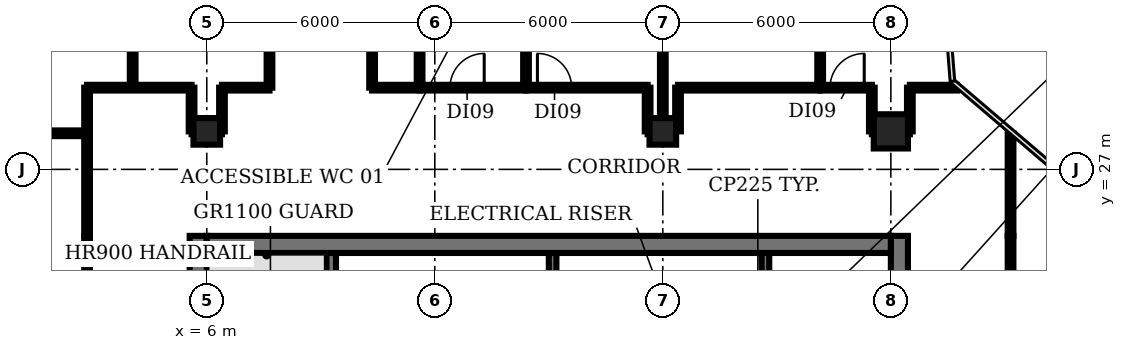
"""IFC4 building model, lengths in metres.
Left out: names, types, materials, properties, quantities, classifications, styles, units other than length and angle.
Written with IfcOpenShell. Run it as: python <this file> out.ifc"""

import sys

from ifc_helpers import new_model, si_unit, direction, frame, frame_2d, origin, origin_2d, place, context, subcontext, project, spatial, rectangle, circle, extrude, element, fill, save


model = new_model("IFC4")
c1 = context("Model", 3, precision=1e-05, world=origin(), true_north=direction((0.0, 1.0)))
c2 = subcontext(c1, "Body", "Model", "MODEL_VIEW")
j1 = project(units=[si_unit("LENGTHUNIT", "METRE"), si_unit("PLANEANGLEUNIT", "RADIAN")], contexts=[c1])
p1 = place(None, origin())
s1 = spatial("IfcSite", under=j1, at=p1, CompositionType="ELEMENT")
p2 = place(p1, origin())
s2 = spatial("IfcBuilding", under=s1, at=p2, CompositionType="ELEMENT")
p3 = place(p2, frame((0.0, 0.0, 209.6)))
s3 = spatial("IfcBuildingStorey", under=s2, at=p3, CompositionType="ELEMENT", Elevation=209.6)
for number, where, z_axis, x_axis in (
    (1, (6.0, 28.0, 0.0), (0.0, 0.0, 1.0), (1.0, 0.0, 0.0)),
    (2, (18.0, 28.0, 0.0), (0.0, 0.0, 1.0), (1.0, 0.0, 0.0)),
):
    element("IfcColumn", number, at=place(p3, frame(where, z_axis=z_axis, x_axis=x_axis)), inside=s3, PredefinedType="COLUMN", context=c2, shape_type="SweptSolid", body=[
        extrude(rectangle(XDim=0.7, YDim=0.7, at=origin_2d()), origin(), (0.0, 0.0, 1.0), 3.8),
    ])
p4 = place(p3, frame((24.0, 28.0, 0.0), z_axis=(0.0, 0.0, 1.0), x_axis=(1.0, 0.0, 0.0)))
e3 = element("IfcColumn", 3, at=p4, inside=s3, PredefinedType="COLUMN", context=c2, shape_type="SweptSolid", body=[
    extrude(circle(Radius=0.45, at=origin_2d()), origin(), (0.0, 0.0, 1.0), 3.8),
])
p5 = place(p3, frame((9.275, 18.375, 0.0), z_axis=(0.0, 0.0, 1.0), x_axis=(0.0, 1.0, 0.0)))
e4 = element("IfcWall", 4, at=p5, inside=s3, PredefinedType="SHEAR", context=c2, shape_type="SweptSolid", body=[
    extrude(rectangle(XDim=6.425, YDim=0.25, at=frame_2d((3.212, 0.0))), origin(), (0.0, 0.0, 1.0), 3.8),
])
for number, where, z_axis, x_axis in (
    (5, (15.1, 22.9, 0.0), (0.0, 0.0, 1.0), (0.0, 1.0, 0.0)),
    (6, (20.7, 22.9, 0.0), (0.0, 0.0, 1.0), (0.0, 1.0, 0.0)),
):
    element("IfcWall", number, at=place(p3, frame(where, z_axis=z_axis, x_axis=x_axis)), inside=s3, PredefinedType="SHEAR", context=c2, shape_type="SweptSolid", body=[
        extrude(rectangle(XDim=1.9, YDim=0.2, at=frame_2d((0.95, 0.0))), origin(), (0.0, 0.0, 1.0), 3.8),
    ])
p6 = place(p3, frame((5.775, 4.42, 0.0), z_axis=(0.0, 0.0, 1.0), x_axis=(0.0, 1.0, 0.0)))
e7 = element("IfcWall", 7, at=p6, inside=s3, PredefinedType="SHEAR", context=c2, shape_type="SweptSolid", body=[
    extrude(rectangle(XDim=20.83, YDim=0.45, at=frame_2d((10.415, 0.0))), origin(), (0.0, 0.0, 1.0), 3.8),
])
p7 = place(p6, frame((1.23, 0.0, 0.0)))
e8 = element("IfcOpeningElement", 8, at=p7, cuts=e7, PredefinedType="OPENING", context=c2, shape_type="SweptSolid", body=[
    extrude(rectangle(XDim=1.5, YDim=2.1, at=frame_2d((0.75, 1.05))), frame((0.0, 0.235, 0.0), z_axis=(0.0, -1.0, 0.0), x_axis=(1.0, 0.0, 0.0)), (0.0, 0.0, 1.0), 0.47),
])
p8 = place(p6, frame((7.68, 0.0, 0.0)))
e9 = element("IfcOpeningElement", 9, at=p8, cuts=e7, PredefinedType="OPENING", context=c2, shape_type="SweptSolid", body=[
    extrude(rectangle(XDim=1.2, YDim=2.1, at=frame_2d((0.6, 1.05))), frame((0.0, 0.235, 0.0), z_axis=(0.0, -1.0, 0.0), x_axis=(1.0, 0.0, 0.0)), (0.0, 0.0, 1.0), 0.47),
])
p9 = place(p6, frame((14.23, 0.0, 0.0)))
e10 = element("IfcOpeningElement", 10, at=p9, cuts=e7, PredefinedType="OPENING", context=c2, shape_type="SweptSolid", body=[
    extrude(rectangle(XDim=1.2, YDim=2.1, at=frame_2d((0.6, 1.05))), frame((0.0, 0.235, 0.0), z_axis=(0.0, -1.0, 0.0), x_axis=(1.0, 0.0, 0.0)), (0.0, 0.0, 1.0), 0.47),
])
p10 = place(p3, frame((24.225, 25.25, 0.0), z_axis=(0.0, 0.0, 1.0), x_axis=(0.0, -1.0, 0.0)))
e11 = element("IfcWall", 11, at=p10, inside=s3, PredefinedType="SHEAR", context=c2, shape_type="SweptSolid", body=[
    extrude(rectangle(XDim=20.83, YDim=0.45, at=frame_2d((10.415, 0.0))), origin(), (0.0, 0.0, 1.0), 3.8),
])
p11 = place(p10, frame((18.1, 0.0, 0.0)))
e12 = element("IfcOpeningElement", 12, at=p11, cuts=e11, PredefinedType="OPENING", context=c2, shape_type="SweptSolid", body=[
    extrude(rectangle(XDim=1.5, YDim=2.1, at=frame_2d((0.75, 1.05))), frame((0.0, 0.235, 0.0), z_axis=(0.0, -1.0, 0.0), x_axis=(1.0, 0.0, 0.0)), (0.0, 0.0, 1.0), 0.47),
])
p12 = place(p10, frame((12.0, 0.0, 0.0)))
e13 = element("IfcOpeningElement", 13, at=p12, cuts=e11, PredefinedType="OPENING", context=c2, shape_type="SweptSolid", body=[
    extrude(rectangle(XDim=0.9, YDim=2.1, at=frame_2d((0.45, 1.05))), frame((0.0, 0.235, 0.0), z_axis=(0.0, -1.0, 0.0), x_axis=(1.0, 0.0, 0.0)), (0.0, 0.0, 1.0), 0.47),
])
p13 = place(p10, frame((6.0, 0.0, 0.0)))
e14 = element("IfcOpeningElement", 14, at=p13, cuts=e11, PredefinedType="OPENING", context=c2, shape_type="SweptSolid", body=[
    extrude(rectangle(XDim=2.0, YDim=2.1, at=frame_2d((1.0, 1.05))), frame((0.0, 0.235, 0.0), z_axis=(0.0, -1.0, 0.0), x_axis=(1.0, 0.0, 0.0)), (0.0, 0.0, 1.0), 0.47),
])
p14 = place(p3, frame((6.0, 25.025, 0.0), z_axis=(0.0, 0.0, 1.0), x_axis=(1.0, 0.0, 0.0)))
e15 = element("IfcWall", 15, at=p14, inside=s3, PredefinedType="SHEAR", context=c2, shape_type="SweptSolid", body=[
    extrude(rectangle(XDim=18.0, YDim=0.45, at=frame_2d((9.0, 0.0))), origin(), (0.0, 0.0, 1.0), 3.8),
])
p15 = place(p3, frame((-0.98, 27.95, 0.0), z_axis=(0.0, 0.0, 1.0), x_axis=(1.0, 0.0, 0.0)))
e16 = element("IfcWall", 16, at=p15, inside=s3, PredefinedType="PARTITIONING", context=c2, shape_type="SweptSolid", body=[
    extrude(rectangle(XDim=3.83, YDim=0.15, at=frame_2d((1.915, 0.0))), origin(), (0.0, 0.0, 1.0), 2.83),
])
p16 = place(p3, frame((2.85, 5.77, 0.0), z_axis=(0.0, 0.0, 1.0), x_axis=(0.0, 1.0, 0.0)))
e17 = element("IfcWall", 17, at=p16, inside=s3, PredefinedType="PARTITIONING", context=c2, shape_type="SweptSolid", body=[
    extrude(rectangle(XDim=19.48, YDim=0.15, at=frame_2d((9.74, 0.0))), origin(), (0.0, 0.0, 1.0), 2.83),
])
p17 = place(p16, frame((8.48, 0.0, 0.0)))
e18 = element("IfcOpeningElement", 18, at=p17, cuts=e17, PredefinedType="OPENING", context=c2, shape_type="SweptSolid", body=[
    extrude(rectangle(XDim=1.2, YDim=2.1, at=frame_2d((0.6, 1.05))), frame((0.0, 0.085, 0.0), z_axis=(0.0, -1.0, 0.0), x_axis=(1.0, 0.0, 0.0)), (0.0, 0.0, 1.0), 0.17),
])
p18 = place(p3, frame((2.85, 25.25, 0.0), z_axis=(0.0, 0.0, 1.0), x_axis=(0.0, 1.0, 0.0)))
e19 = element("IfcWall", 19, at=p18, inside=s3, PredefinedType="PARTITIONING", context=c2, shape_type="SweptSolid", body=[
    extrude(rectangle(XDim=3.9, YDim=0.15, at=frame_2d((1.95, 0.0))), origin(), (0.0, 0.0, 1.0), 2.83),
])
p19 = place(p3, frame((2.85, 29.15, 0.0), z_axis=(0.0, 0.0, 1.0), x_axis=(1.0, 0.0, 0.0)))
e20 = element("IfcWall", 20, at=p19, inside=s3, PredefinedType="PARTITIONING", context=c2, shape_type="SweptSolid", body=[
    extrude(rectangle(XDim=2.75, YDim=0.15, at=frame_2d((1.375, 0.0))), origin(), (0.0, 0.0, 1.0), 2.83),
])
p20 = place(p3, frame((4.05, 29.15, 0.0), z_axis=(0.0, 0.0, 1.0), x_axis=(0.0, 1.0, 0.0)))
e21 = element("IfcWall", 21, at=p20, inside=s3, PredefinedType="PARTITIONING", context=c2, shape_type="SweptSolid", body=[
    extrude(rectangle(XDim=4.8, YDim=0.15, at=frame_2d((2.4, 0.0))), origin(), (0.0, 0.0, 1.0), 2.83),
])
p21 = place(p3, frame((5.6, 28.0, 0.0), z_axis=(0.0, 0.0, 1.0), x_axis=(0.0, 1.0, 0.0)))
e22 = element("IfcWall", 22, at=p21, inside=s3, PredefinedType="PARTITIONING", context=c2, shape_type="SweptSolid", body=[
    extrude(rectangle(XDim=1.15, YDim=0.15, at=frame_2d((0.575, 0.0))), origin(), (0.0, 0.0, 1.0), 2.83),
])
p22 = place(p3, frame((5.6, 28.0, 0.0), z_axis=(0.0, 0.0, 1.0), x_axis=(1.0, 0.0, 0.0)))
e23 = element("IfcWall", 23, at=p22, inside=s3, PredefinedType="PARTITIONING", context=c2, shape_type="SweptSolid", body=[
    extrude(rectangle(XDim=0.8, YDim=0.15, at=frame_2d((0.4, 0.0))), origin(), (0.0, 0.0, 1.0), 2.83),
])
p23 = place(p3, frame((6.4, 28.0, 0.0), z_axis=(0.0, 0.0, 1.0), x_axis=(0.0, 1.0, 0.0)))
e24 = element("IfcWall", 24, at=p23, inside=s3, PredefinedType="PARTITIONING", context=c2, shape_type="SweptSolid", body=[
    extrude(rectangle(XDim=1.15, YDim=0.15, at=frame_2d((0.575, 0.0))), origin(), (0.0, 0.0, 1.0), 2.83),
])
p24 = place(p3, frame((6.4, 29.15, 0.0), z_axis=(0.0, 0.0, 1.0), x_axis=(1.0, 0.0, 0.0)))
e25 = element("IfcWall", 25, at=p24, inside=s3, PredefinedType="PARTITIONING", context=c2, shape_type="SweptSolid", body=[
    extrude(rectangle(XDim=1.25, YDim=0.15, at=frame_2d((0.625, 0.0))), origin(), (0.0, 0.0, 1.0), 2.83),
])
p25 = place(p3, frame((7.65, 29.15, 0.0), z_axis=(0.0, 0.0, 1.0), x_axis=(0.0, 1.0, 0.0)))
e26 = element("IfcWall", 26, at=p25, inside=s3, PredefinedType="PARTITIONING", context=c2, shape_type="SweptSolid", body=[
    extrude(rectangle(XDim=4.8, YDim=0.15, at=frame_2d((2.4, 0.0))), origin(), (0.0, 0.0, 1.0), 2.83),
])
p26 = place(p25, frame((1.9, 0.0, 0.0)))
e27 = element("IfcOpeningElement", 27, at=p26, cuts=e26, PredefinedType="OPENING", context=c2, shape_type="SweptSolid", body=[
    extrude(rectangle(XDim=0.9, YDim=2.1, at=frame_2d((0.45, 1.05))), frame((0.0, 0.085, 0.0), z_axis=(0.0, -1.0, 0.0), x_axis=(1.0, 0.0, 0.0)), (0.0, 0.0, 1.0), 0.17),
])
p27 = place(p3, frame((10.35, 29.15, 0.0), z_axis=(0.0, 0.0, 1.0), x_axis=(0.0, 1.0, 0.0)))
e28 = element("IfcWall", 28, at=p27, inside=s3, PredefinedType="PARTITIONING", context=c2, shape_type="SweptSolid", body=[
    extrude(rectangle(XDim=4.8, YDim=0.15, at=frame_2d((2.4, 0.0))), origin(), (0.0, 0.0, 1.0), 2.83),
])
p28 = place(p3, frame((10.35, 29.15, 0.0), z_axis=(0.0, 0.0, 1.0), x_axis=(1.0, 0.0, 0.0)))
e29 = element("IfcWall", 29, at=p28, inside=s3, PredefinedType="PARTITIONING", context=c2, shape_type="SweptSolid", body=[
    extrude(rectangle(XDim=1.25, YDim=0.15, at=frame_2d((0.625, 0.0))), origin(), (0.0, 0.0, 1.0), 2.83),
])
p29 = place(p3, frame((11.6, 29.15, 0.0), z_axis=(0.0, 0.0, 1.0), x_axis=(0.0, 1.0, 0.0)))
e30 = element("IfcWall", 30, at=p29, inside=s3, PredefinedType="PARTITIONING", context=c2, shape_type="SweptSolid", body=[
    extrude(rectangle(XDim=4.72, YDim=0.15, at=frame_2d((2.36, 0.0))), origin(), (0.0, 0.0, 1.0), 2.83),
])
p30 = place(p3, frame((11.6, 29.15, 0.0), z_axis=(0.0, 0.0, 1.0), x_axis=(1.0, 0.0, 0.0)))
e31 = element("IfcWall", 31, at=p30, inside=s3, PredefinedType="PARTITIONING", context=c2, shape_type="SweptSolid", body=[
    extrude(rectangle(XDim=2.8, YDim=0.15, at=frame_2d((1.4, 0.0))), origin(), (0.0, 0.0, 1.0), 2.83),
])
p31 = place(p30, frame((0.8, 0.0, 0.0)))
e32 = element("IfcOpeningElement", 32, at=p31, cuts=e31, PredefinedType="OPENING", context=c2, shape_type="SweptSolid", body=[
    extrude(rectangle(XDim=0.9, YDim=2.1, at=frame_2d((0.45, 1.05))), frame((0.0, 0.085, 0.0), z_axis=(0.0, -1.0, 0.0), x_axis=(1.0, 0.0, 0.0)), (0.0, 0.0, 1.0), 0.17),
])
p32 = place(p3, frame((14.4, 29.15, 0.0), z_axis=(0.0, 0.0, 1.0), x_axis=(0.0, 1.0, 0.0)))
e33 = element("IfcWall", 33, at=p32, inside=s3, PredefinedType="PARTITIONING", context=c2, shape_type="SweptSolid", body=[
    extrude(rectangle(XDim=4.8, YDim=0.15, at=frame_2d((2.4, 0.0))), origin(), (0.0, 0.0, 1.0), 2.83),
])
p33 = place(p3, frame((14.4, 29.15, 0.0), z_axis=(0.0, 0.0, 1.0), x_axis=(1.0, 0.0, 0.0)))
e34 = element("IfcWall", 34, at=p33, inside=s3, PredefinedType="PARTITIONING", context=c2, shape_type="SweptSolid", body=[
    extrude(rectangle(XDim=3.2, YDim=0.15, at=frame_2d((1.6, 0.0))), origin(), (0.0, 0.0, 1.0), 2.83),
])
p34 = place(p33, frame((0.3, 0.0, 0.0)))
e35 = element("IfcOpeningElement", 35, at=p34, cuts=e34, PredefinedType="OPENING", context=c2, shape_type="SweptSolid", body=[
    extrude(rectangle(XDim=0.9, YDim=2.1, at=frame_2d((0.45, 1.05))), frame((0.0, 0.085, 0.0), z_axis=(0.0, -1.0, 0.0), x_axis=(1.0, 0.0, 0.0)), (0.0, 0.0, 1.0), 0.17),
])
p35 = place(p3, frame((17.6, 28.0, 0.0), z_axis=(0.0, 0.0, 1.0), x_axis=(0.0, 1.0, 0.0)))
e36 = element("IfcWall", 36, at=p35, inside=s3, PredefinedType="PARTITIONING", context=c2, shape_type="SweptSolid", body=[
    extrude(rectangle(XDim=1.15, YDim=0.15, at=frame_2d((0.575, 0.0))), origin(), (0.0, 0.0, 1.0), 2.83),
])
p36 = place(p3, frame((17.6, 28.0, 0.0), z_axis=(0.0, 0.0, 1.0), x_axis=(1.0, 0.0, 0.0)))
e37 = element("IfcWall", 37, at=p36, inside=s3, PredefinedType="PARTITIONING", context=c2, shape_type="SweptSolid", body=[
    extrude(rectangle(XDim=0.4, YDim=0.15, at=frame_2d((0.2, 0.0))), origin(), (0.0, 0.0, 1.0), 2.83),
])
p37 = place(p3, frame((18.0, 28.0, 0.0), z_axis=(0.0, 0.0, 1.0), x_axis=(0.0, 1.0, 0.0)))
e38 = element("IfcWall", 38, at=p37, inside=s3, PredefinedType="PARTITIONING", context=c2, shape_type="SweptSolid", body=[
    extrude(rectangle(XDim=5.95, YDim=0.15, at=frame_2d((2.975, 0.0))), origin(), (0.0, 0.0, 1.0), 2.83),
])
p38 = place(p3, frame((18.4, 28.0, 0.0), z_axis=(0.0, 0.0, 1.0), x_axis=(0.0, 1.0, 0.0)))
e39 = element("IfcWall", 39, at=p38, inside=s3, PredefinedType="PARTITIONING", context=c2, shape_type="SweptSolid", body=[
    extrude(rectangle(XDim=1.15, YDim=0.15, at=frame_2d((0.575, 0.0))), origin(), (0.0, 0.0, 1.0), 2.83),
])
p39 = place(p3, frame((18.4, 29.15, 0.0), z_axis=(0.0, 0.0, 1.0), x_axis=(1.0, 0.0, 0.0)))
e40 = element("IfcWall", 40, at=p39, inside=s3, PredefinedType="PARTITIONING", context=c2, shape_type="SweptSolid", body=[
    extrude(rectangle(XDim=3.74, YDim=0.15, at=frame_2d((1.87, 0.0))), origin(), (0.0, 0.0, 1.0), 2.83),
])
p40 = place(p3, frame((22.14, 29.15, 0.0), z_axis=(0.0, 0.0, 1.0), x_axis=(0.0, 1.0, 0.0)))
e41 = element("IfcWall", 41, at=p40, inside=s3, PredefinedType="PARTITIONING", context=c2, shape_type="SweptSolid", body=[
    extrude(rectangle(XDim=4.8, YDim=0.15, at=frame_2d((2.4, 0.0))), origin(), (0.0, 0.0, 1.0), 2.83),
])
p41 = place(p3, frame((22.14, 29.15, 0.0), z_axis=(0.0, 0.0, 1.0), x_axis=(1.0, 0.0, 0.0)))
e42 = element("IfcWall", 42, at=p41, inside=s3, PredefinedType="PARTITIONING", context=c2, shape_type="SweptSolid", body=[
    extrude(rectangle(XDim=1.36, YDim=0.15, at=frame_2d((0.68, 0.0))), origin(), (0.0, 0.0, 1.0), 2.83),
])
p42 = place(p41, frame((0.26, 0.0, 0.0)))
e43 = element("IfcOpeningElement", 43, at=p42, cuts=e42, PredefinedType="OPENING", context=c2, shape_type="SweptSolid", body=[
    extrude(rectangle(XDim=0.9, YDim=2.1, at=frame_2d((0.45, 1.05))), frame((0.0, 0.085, 0.0), z_axis=(0.0, -1.0, 0.0), x_axis=(1.0, 0.0, 0.0)), (0.0, 0.0, 1.0), 0.17),
])
p43 = place(p3, frame((23.5, 28.0, 0.0), z_axis=(0.0, 0.0, 1.0), x_axis=(0.0, 1.0, 0.0)))
e44 = element("IfcWall", 44, at=p43, inside=s3, PredefinedType="PARTITIONING", context=c2, shape_type="SweptSolid", body=[
    extrude(rectangle(XDim=1.15, YDim=0.15, at=frame_2d((0.575, 0.0))), origin(), (0.0, 0.0, 1.0), 2.83),
])
p44 = place(p3, frame((23.5, 28.0, 0.0), z_axis=(0.0, 0.0, 1.0), x_axis=(1.0, 0.0, 0.0)))
e45 = element("IfcWall", 45, at=p44, inside=s3, PredefinedType="PARTITIONING", context=c2, shape_type="SweptSolid", body=[
    extrude(rectangle(XDim=1.0, YDim=0.15, at=frame_2d((0.5, 0.0))), origin(), (0.0, 0.0, 1.0), 2.83),
])
p45 = place(p3, frame((24.5, 28.0, 0.0), z_axis=(0.0, 0.0, 1.0), x_axis=(0.0, 1.0, 0.0)))
e46 = element("IfcWall", 46, at=p45, inside=s3, PredefinedType="PARTITIONING", context=c2, shape_type="SweptSolid", body=[
    extrude(rectangle(XDim=1.15, YDim=0.15, at=frame_2d((0.575, 0.0))), origin(), (0.0, 0.0, 1.0), 2.83),
])
p46 = place(p3, frame((24.5, 29.15, 0.0), z_axis=(0.0, 0.0, 1.0), x_axis=(1.0, 0.0, 0.0)))
e47 = element("IfcWall", 47, at=p46, inside=s3, PredefinedType="PARTITIONING", context=c2, shape_type="SweptSolid", body=[
    extrude(rectangle(XDim=1.24, YDim=0.15, at=frame_2d((0.62, 0.0))), origin(), (0.0, 0.0, 1.0), 2.83),
])
p47 = place(p3, frame((27.15, 25.25, 0.0), z_axis=(0.0, 0.0, 1.0), x_axis=(0.0, -1.0, 0.0)))
e48 = element("IfcWall", 48, at=p47, inside=s3, PredefinedType="PARTITIONING", context=c2, shape_type="SweptSolid", body=[
    extrude(rectangle(XDim=5.85, YDim=0.15, at=frame_2d((2.925, 0.0))), origin(), (0.0, 0.0, 1.0), 2.83),
])
p48 = place(p47, frame((1.45, 0.0, 0.0)))
e49 = element("IfcOpeningElement", 49, at=p48, cuts=e48, PredefinedType="OPENING", context=c2, shape_type="SweptSolid", body=[
    extrude(rectangle(XDim=1.2, YDim=2.1, at=frame_2d((0.6, 1.05))), frame((0.0, 0.085, 0.0), z_axis=(0.0, -1.0, 0.0), x_axis=(1.0, 0.0, 0.0)), (0.0, 0.0, 1.0), 0.17),
])
p49 = place(p3, frame((27.15, 25.25, 0.0), z_axis=(0.0, 0.0, 1.0), x_axis=(0.0, 1.0, 0.0)))
e50 = element("IfcWall", 50, at=p49, inside=s3, PredefinedType="PARTITIONING", context=c2, shape_type="SweptSolid", body=[
    extrude(rectangle(XDim=2.7, YDim=0.15, at=frame_2d((1.35, 0.0))), origin(), (0.0, 0.0, 1.0), 2.83),
])
p50 = place(p31, origin())
e51 = element("IfcDoor", 51, at=p50, inside=s3, OperationType="SINGLE_SWING_RIGHT", PredefinedType="DOOR", context=c2, shape_type="SweptSolid", body=[
    extrude(rectangle(XDim=0.9, YDim=2.1, at=frame_2d((0.45, 1.05))), frame((0.0, 0.025, 0.0), z_axis=(0.0, -1.0, 0.0), x_axis=(1.0, 0.0, 0.0)), (0.0, 0.0, 1.0), 0.05),
])
fill(e32, e51)
p51 = place(p34, origin())
e52 = element("IfcDoor", 52, at=p51, inside=s3, OperationType="SINGLE_SWING_LEFT", PredefinedType="DOOR", context=c2, shape_type="SweptSolid", body=[
    extrude(rectangle(XDim=0.9, YDim=2.1, at=frame_2d((0.45, 1.05))), frame((0.0, 0.025, 0.0), z_axis=(0.0, -1.0, 0.0), x_axis=(1.0, 0.0, 0.0)), (0.0, 0.0, 1.0), 0.05),
])
fill(e35, e52)
p52 = place(p42, origin())
e53 = element("IfcDoor", 53, at=p52, inside=s3, OperationType="SINGLE_SWING_RIGHT", PredefinedType="DOOR", context=c2, shape_type="SweptSolid", body=[
    extrude(rectangle(XDim=0.9, YDim=2.1, at=frame_2d((0.45, 1.05))), frame((0.0, 0.025, 0.0), z_axis=(0.0, -1.0, 0.0), x_axis=(1.0, 0.0, 0.0)), (0.0, 0.0, 1.0), 0.05),
])
fill(e43, e53)
save(model, sys.argv[1])
